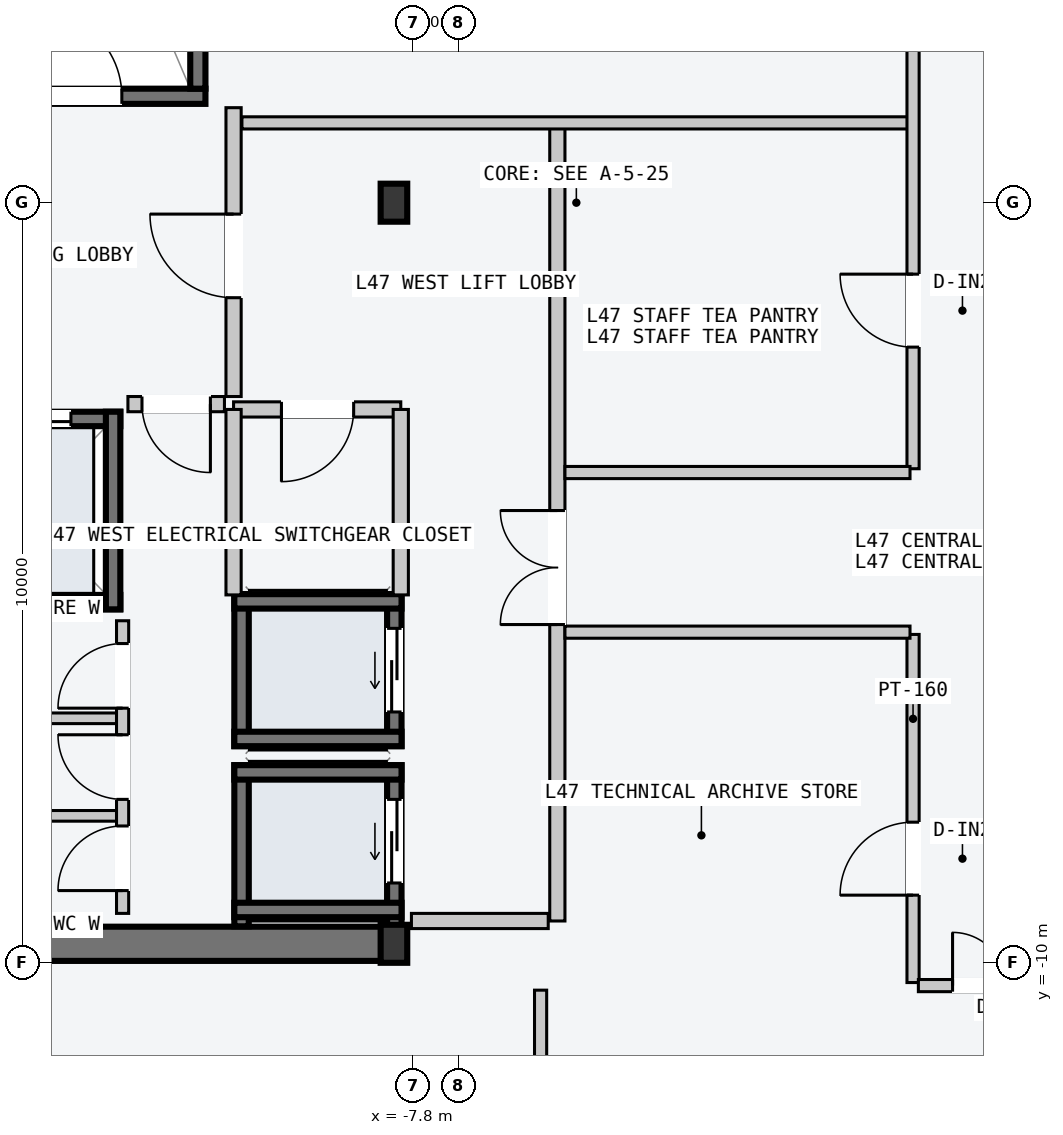
"""IFC4 building model, lengths in metres.
Left out: names, types, materials, properties, quantities, classifications, styles, units other than length and angle.
Written with IfcOpenShell. Run it as: python <this file> out.ifc"""

import sys

from ifc_helpers import new_model, si_unit, direction, frame, frame_2d, origin, origin_2d, place, context, subcontext, project, spatial, rectangle, i_section, extrude, element, fill, save


model = new_model("IFC4")
c1 = context("Model", 3, precision=1e-05, world=origin(), true_north=direction((0.0, 1.0)))
c2 = subcontext(c1, "Body", "Model", "MODEL_VIEW")
j1 = project(units=[si_unit("LENGTHUNIT", "METRE"), si_unit("PLANEANGLEUNIT", "RADIAN")], contexts=[c1])
p1 = place(None, origin())
s1 = spatial("IfcSite", under=j1, at=p1, CompositionType="ELEMENT")
p2 = place(p1, origin())
s2 = spatial("IfcBuilding", under=s1, at=p2, CompositionType="ELEMENT")
p3 = place(p2, frame((0.0, 0.0, 180.3)))
s3 = spatial("IfcBuildingStorey", under=s2, at=p3, CompositionType="ELEMENT", Elevation=180.3)
p4 = place(p3, frame((-14.53, -9.75, -0.2), z_axis=(0.0, 0.0, 1.0), x_axis=(1.0, 0.0, 0.0)))
e1 = element("IfcWall", 1, at=p4, inside=s3, PredefinedType="SHEAR", context=c2, shape_type="SweptSolid", body=[
    extrude(rectangle(XDim=6.46, YDim=0.45, at=frame_2d((3.23, 0.0))), origin(), (0.0, 0.0, 1.0), 3.6),
])
p5 = place(p3, frame((-14.25, 1.4, -0.2), z_axis=(0.0, 0.0, 1.0), x_axis=(1.0, 0.0, 0.0)))
e2 = element("IfcWall", 2, at=p5, inside=s3, PredefinedType="SOLIDWALL", context=c2, shape_type="SweptSolid", body=[
    extrude(rectangle(XDim=3.72, YDim=0.2, at=frame_2d((1.86, 0.0))), origin(), (0.0, 0.0, 1.0), 3.6),
])
p6 = place(p5, frame((1.5, 0.0, 0.2)))
e3 = element("IfcOpeningElement", 3, at=p6, cuts=e2, PredefinedType="OPENING", context=c2, shape_type="SweptSolid", body=[
    extrude(rectangle(XDim=1.12, YDim=2.18, at=frame_2d((0.56, 1.09))), frame((0.0, 0.11, 0.0), z_axis=(0.0, -1.0, 0.0), x_axis=(1.0, 0.0, 0.0)), (0.0, 0.0, 1.0), 0.22),
])
p7 = place(p3, frame((-10.63, 1.5, -0.2), z_axis=(0.0, 0.0, 1.0), x_axis=(0.0, 1.0, 0.0)))
e4 = element("IfcWall", 4, at=p7, inside=s3, PredefinedType="SOLIDWALL", context=c2, shape_type="SweptSolid", body=[
    extrude(rectangle(XDim=7.8, YDim=0.2, at=frame_2d((3.9, 0.0))), origin(), (0.0, 0.0, 1.0), 3.6),
])
for number, where, z_axis, x_axis in (
    (5, (-8.05, -9.75, 0.0), (0.0, 0.0, 1.0), (1.0, 0.0, 0.0)),
    (6, (-8.05, 0.0, 0.0), (0.0, 0.0, 1.0), (1.0, 0.0, 0.0)),
):
    element("IfcColumn", number, at=place(p3, frame(where, z_axis=z_axis, x_axis=x_axis)), inside=s3, PredefinedType="COLUMN", context=c2, shape_type="SweptSolid", body=[
        extrude(i_section(OverallWidth=0.35, OverallDepth=0.5, WebThickness=0.02, FlangeThickness=0.032, at=origin_2d()), origin(), (0.0, 0.0, 1.0), 3.6),
    ])
p8 = place(p3, frame((-8.045, -9.52, -0.2), z_axis=(0.0, 0.0, 1.0), x_axis=(0.0, 1.0, 0.0)))
e7 = element("IfcWall", 7, at=p8, inside=s3, PredefinedType="SOLIDWALL", context=c2, shape_type="SweptSolid", body=[
    extrude(rectangle(XDim=2.12, YDim=0.19, at=frame_2d((1.06, 0.0))), origin(), (0.0, 0.0, 1.0), 3.6),
])
p9 = place(p8, frame((0.57, 0.0, 0.2)))
e8 = element("IfcOpeningElement", 8, at=p9, cuts=e7, PredefinedType="OPENING", context=c2, shape_type="SweptSolid", body=[
    extrude(rectangle(XDim=1.1, YDim=2.2, at=frame_2d((0.55, 1.1))), frame((0.0, 0.105, 0.0), z_axis=(0.0, -1.0, 0.0), x_axis=(1.0, 0.0, 0.0)), (0.0, 0.0, 1.0), 0.21),
])
p10 = place(p3, frame((-10.055, -9.52, -0.2), z_axis=(0.0, 0.0, 1.0), x_axis=(0.0, 1.0, 0.0)))
e9 = element("IfcWall", 9, at=p10, inside=s3, PredefinedType="SOLIDWALL", context=c2, shape_type="SweptSolid", body=[
    extrude(rectangle(XDim=2.12, YDim=0.19, at=frame_2d((1.06, 0.0))), origin(), (0.0, 0.0, 1.0), 3.6),
])
for number, where, z_axis, x_axis in (
    (10, (-10.15, -7.495, -0.2), (0.0, 0.0, 1.0), (1.0, 0.0, 0.0)),
    (11, (-10.15, -9.305, -0.2), (0.0, 0.0, 1.0), (1.0, 0.0, 0.0)),
):
    element("IfcWall", number, at=place(p3, frame(where, z_axis=z_axis, x_axis=x_axis)), inside=s3, PredefinedType="SOLIDWALL", context=c2, shape_type="SweptSolid", body=[
        extrude(rectangle(XDim=2.2, YDim=0.19, at=frame_2d((1.1, 0.0))), origin(), (0.0, 0.0, 1.0), 3.6),
    ])
p11 = place(p3, frame((-8.045, -7.15, -0.2), z_axis=(0.0, 0.0, 1.0), x_axis=(0.0, 1.0, 0.0)))
e12 = element("IfcWall", 12, at=p11, inside=s3, PredefinedType="SOLIDWALL", context=c2, shape_type="SweptSolid", body=[
    extrude(rectangle(XDim=2.0, YDim=0.19, at=frame_2d((1.0, 0.0))), origin(), (0.0, 0.0, 1.0), 3.6),
])
p12 = place(p11, frame((0.45, 0.0, 0.2)))
e13 = element("IfcOpeningElement", 13, at=p12, cuts=e12, PredefinedType="OPENING", context=c2, shape_type="SweptSolid", body=[
    extrude(rectangle(XDim=1.1, YDim=2.2, at=frame_2d((0.55, 1.1))), frame((0.0, 0.105, 0.0), z_axis=(0.0, -1.0, 0.0), x_axis=(1.0, 0.0, 0.0)), (0.0, 0.0, 1.0), 0.21),
])
p13 = place(p3, frame((-10.055, -7.15, -0.2), z_axis=(0.0, 0.0, 1.0), x_axis=(0.0, 1.0, 0.0)))
e14 = element("IfcWall", 14, at=p13, inside=s3, PredefinedType="SOLIDWALL", context=c2, shape_type="SweptSolid", body=[
    extrude(rectangle(XDim=2.0, YDim=0.19, at=frame_2d((1.0, 0.0))), origin(), (0.0, 0.0, 1.0), 3.6),
])
for number, where, z_axis, x_axis in (
    (15, (-10.15, -5.245, -0.2), (0.0, 0.0, 1.0), (1.0, 0.0, 0.0)),
    (16, (-10.15, -7.055, -0.2), (0.0, 0.0, 1.0), (1.0, 0.0, 0.0)),
):
    element("IfcWall", number, at=place(p3, frame(where, z_axis=z_axis, x_axis=x_axis)), inside=s3, PredefinedType="SOLIDWALL", context=c2, shape_type="SweptSolid", body=[
        extrude(rectangle(XDim=2.2, YDim=0.19, at=frame_2d((1.1, 0.0))), origin(), (0.0, 0.0, 1.0), 3.6),
    ])
p14 = place(p3, frame((-14.33, -2.845, -0.2), z_axis=(0.0, 0.0, 1.0), x_axis=(1.0, 0.0, 0.0)))
e17 = element("IfcWall", 17, at=p14, inside=s3, PredefinedType="SOLIDWALL", context=c2, shape_type="SweptSolid", body=[
    extrude(rectangle(XDim=2.68, YDim=0.19, at=frame_2d((1.34, 0.0))), origin(), (0.0, 0.0, 1.0), 3.6),
])
p15 = place(p14, frame((0.83, 0.0, 0.2)))
e18 = element("IfcOpeningElement", 18, at=p15, cuts=e17, PredefinedType="OPENING", context=c2, shape_type="SweptSolid", body=[
    extrude(rectangle(XDim=1.2, YDim=2.2, at=frame_2d((0.6, 1.1))), frame((0.0, 0.105, 0.0), z_axis=(0.0, -1.0, 0.0), x_axis=(1.0, 0.0, 0.0)), (0.0, 0.0, 1.0), 0.21),
])
p16 = place(p3, frame((-14.33, -5.255, -0.2), z_axis=(0.0, 0.0, 1.0), x_axis=(1.0, 0.0, 0.0)))
e19 = element("IfcWall", 19, at=p16, inside=s3, PredefinedType="SOLIDWALL", context=c2, shape_type="SweptSolid", body=[
    extrude(rectangle(XDim=2.68, YDim=0.19, at=frame_2d((1.34, 0.0))), origin(), (0.0, 0.0, 1.0), 3.6),
])
p17 = place(p3, frame((-11.745, -5.35, -0.2), z_axis=(0.0, 0.0, 1.0), x_axis=(0.0, 1.0, 0.0)))
e20 = element("IfcWall", 20, at=p17, inside=s3, PredefinedType="SOLIDWALL", context=c2, shape_type="SweptSolid", body=[
    extrude(rectangle(XDim=2.6, YDim=0.19, at=frame_2d((1.3, 0.0))), origin(), (0.0, 0.0, 1.0), 3.6),
])
p18 = place(p3, frame((-5.9, -9.45, 0.0), z_axis=(0.0, 0.0, 1.0), x_axis=(0.0, 1.0, 0.0)))
e21 = element("IfcWall", 21, at=p18, inside=s3, PredefinedType="PARTITIONING", context=c2, shape_type="SweptSolid", body=[
    extrude(rectangle(XDim=10.5, YDim=0.2, at=frame_2d((5.25, 0.0))), origin(), (0.0, 0.0, 1.0), 3.4),
])
p19 = place(p18, frame((3.9, 0.0, 0.0)))
e22 = element("IfcOpeningElement", 22, at=p19, cuts=e21, PredefinedType="OPENING", context=c2, shape_type="SweptSolid", body=[
    extrude(rectangle(XDim=1.5, YDim=2.2, at=frame_2d((0.75, 1.1))), frame((0.0, 0.11, 0.0), z_axis=(0.0, -1.0, 0.0), x_axis=(1.0, 0.0, 0.0)), (0.0, 0.0, 1.0), 0.22),
])
p20 = place(p3, frame((-6.02, -9.45, 0.0), z_axis=(0.0, 0.0, 1.0), x_axis=(-1.0, 0.0, 0.0)))
e23 = element("IfcWall", 23, at=p20, inside=s3, PredefinedType="PARTITIONING", context=c2, shape_type="SweptSolid", body=[
    extrude(rectangle(XDim=1.8, YDim=0.2, at=frame_2d((0.9, 0.0))), origin(), (0.0, 0.0, 1.0), 3.4),
])
p21 = place(p3, frame((-10.16, -2.55, 0.0), z_axis=(0.0, 0.0, 1.0), x_axis=(0.0, 1.0, 0.0)))
e24 = element("IfcWall", 24, at=p21, inside=s3, PredefinedType="PARTITIONING", context=c2, shape_type="SweptSolid", body=[
    extrude(rectangle(XDim=3.8, YDim=0.2, at=frame_2d((1.9, 0.0))), origin(), (0.0, 0.0, 1.0), 3.4),
])
p22 = place(p21, frame((1.3, 0.0, 0.0)))
e25 = element("IfcOpeningElement", 25, at=p22, cuts=e24, PredefinedType="OPENING", context=c2, shape_type="SweptSolid", body=[
    extrude(rectangle(XDim=1.1, YDim=2.15, at=frame_2d((0.55, 1.075))), frame((0.0, 0.11, 0.0), z_axis=(0.0, -1.0, 0.0), x_axis=(1.0, 0.0, 0.0)), (0.0, 0.0, 1.0), 0.22),
])
p23 = place(p3, frame((-10.28, -2.65, 0.0), z_axis=(0.0, 0.0, 1.0), x_axis=(-1.0, 0.0, 0.0)))
e26 = element("IfcWall", 26, at=p23, inside=s3, PredefinedType="PARTITIONING", context=c2, shape_type="SweptSolid", body=[
    extrude(rectangle(XDim=1.27, YDim=0.2, at=frame_2d((0.635, 0.0))), origin(), (0.0, 0.0, 1.0), 3.4),
])
p24 = place(p23, frame((0.185, 0.0, 0.0)))
e27 = element("IfcOpeningElement", 27, at=p24, cuts=e26, PredefinedType="OPENING", context=c2, shape_type="SweptSolid", body=[
    extrude(rectangle(XDim=0.9, YDim=2.15, at=frame_2d((0.45, 1.075))), frame((0.0, 0.11, 0.0), z_axis=(0.0, -1.0, 0.0), x_axis=(1.0, 0.0, 0.0)), (0.0, 0.0, 1.0), 0.22),
])
p25 = place(p3, frame((-7.96, -2.72, 0.0), z_axis=(0.0, 0.0, 1.0), x_axis=(-1.0, 0.0, 0.0)))
e28 = element("IfcWall", 28, at=p25, inside=s3, PredefinedType="PARTITIONING", context=c2, shape_type="SweptSolid", body=[
    extrude(rectangle(XDim=2.2, YDim=0.2, at=frame_2d((1.1, 0.0))), origin(), (0.0, 0.0, 1.0), 3.4),
])
p26 = place(p25, frame((0.62, 0.0, 0.0)))
e29 = element("IfcOpeningElement", 29, at=p26, cuts=e28, PredefinedType="OPENING", context=c2, shape_type="SweptSolid", body=[
    extrude(rectangle(XDim=0.95, YDim=2.1, at=frame_2d((0.475, 1.05))), frame((0.0, 0.11, 0.0), z_axis=(0.0, -1.0, 0.0), x_axis=(1.0, 0.0, 0.0)), (0.0, 0.0, 1.0), 0.22),
])
for number, where, z_axis, x_axis in (
    (30, (-7.96, -5.16, 0.0), (0.0, 0.0, 1.0), (0.0, 1.0, 0.0)),
    (31, (-10.16, -5.16, 0.0), (0.0, 0.0, 1.0), (0.0, 1.0, 0.0)),
):
    element("IfcWall", number, at=place(p3, frame(where, z_axis=z_axis, x_axis=x_axis)), inside=s3, PredefinedType="PARTITIONING", context=c2, shape_type="SweptSolid", body=[
        extrude(rectangle(XDim=2.44, YDim=0.2, at=frame_2d((1.22, 0.0))), origin(), (0.0, 0.0, 1.0), 3.4),
    ])
for number, where, z_axis, x_axis in (
    (32, (-11.7, -8.067, 0.0), (0.0, 0.0, 1.0), (-1.0, 0.0, 0.0)),
    (33, (-11.7, -6.783, 0.0), (0.0, 0.0, 1.0), (-1.0, 0.0, 0.0)),
):
    element("IfcWall", number, at=place(p3, frame(where, z_axis=z_axis, x_axis=x_axis)), inside=s3, PredefinedType="PARTITIONING", context=c2, shape_type="SweptSolid", body=[
        extrude(rectangle(XDim=2.5, YDim=0.14, at=frame_2d((1.25, 0.0))), origin(), (0.0, 0.0, 1.0), 3.4),
    ])
p27 = place(p3, frame((-11.62, -9.35, 0.0), z_axis=(0.0, 0.0, 1.0), x_axis=(0.0, 1.0, 0.0)))
e34 = element("IfcWall", 34, at=p27, inside=s3, PredefinedType="PARTITIONING", context=c2, shape_type="SweptSolid", body=[
    extrude(rectangle(XDim=3.85, YDim=0.16, at=frame_2d((1.925, 0.0))), origin(), (0.0, 0.0, 1.0), 3.4),
])
p28 = place(p27, frame((0.3, 0.0, 0.0)))
e35 = element("IfcOpeningElement", 35, at=p28, cuts=e34, PredefinedType="OPENING", context=c2, shape_type="SweptSolid", body=[
    extrude(rectangle(XDim=0.85, YDim=2.12, at=frame_2d((0.425, 1.06))), frame((0.0, 0.09, 0.0), z_axis=(0.0, -1.0, 0.0), x_axis=(1.0, 0.0, 0.0)), (0.0, 0.0, 1.0), 0.18),
])
p29 = place(p27, frame((1.5, 0.0, 0.0)))
e36 = element("IfcOpeningElement", 36, at=p29, cuts=e34, PredefinedType="OPENING", context=c2, shape_type="SweptSolid", body=[
    extrude(rectangle(XDim=0.85, YDim=2.12, at=frame_2d((0.425, 1.06))), frame((0.0, 0.09, 0.0), z_axis=(0.0, -1.0, 0.0), x_axis=(1.0, 0.0, 0.0)), (0.0, 0.0, 1.0), 0.18),
])
p30 = place(p27, frame((2.7, 0.0, 0.0)))
e37 = element("IfcOpeningElement", 37, at=p30, cuts=e34, PredefinedType="OPENING", context=c2, shape_type="SweptSolid", body=[
    extrude(rectangle(XDim=0.85, YDim=2.12, at=frame_2d((0.425, 1.06))), frame((0.0, 0.09, 0.0), z_axis=(0.0, -1.0, 0.0), x_axis=(1.0, 0.0, 0.0)), (0.0, 0.0, 1.0), 0.18),
])
p31 = place(p3, frame((-10.05, 1.05, 0.0), z_axis=(0.0, 0.0, 1.0), x_axis=(1.0, 0.0, 0.0)))
e38 = element("IfcWall", 38, at=p31, inside=s3, PredefinedType="PARTITIONING", context=c2, shape_type="SweptSolid", body=[
    extrude(rectangle(XDim=8.79, YDim=0.16, at=frame_2d((4.395, 0.0))), origin(), (0.0, 0.0, 1.0), 3.4),
])
p32 = place(p3, frame((-1.22, -3.5, 0.0), z_axis=(0.0, 0.0, 1.0), x_axis=(0.0, 1.0, 0.0)))
e39 = element("IfcWall", 39, at=p32, inside=s3, PredefinedType="PARTITIONING", context=c2, shape_type="SweptSolid", body=[
    extrude(rectangle(XDim=15.17, YDim=0.16, at=frame_2d((7.585, 0.0))), origin(), (0.0, 0.0, 1.0), 3.4),
])
p33 = place(p32, frame((6.1, 0.0, 0.0)))
e40 = element("IfcOpeningElement", 40, at=p33, cuts=e39, PredefinedType="OPENING", context=c2, shape_type="SweptSolid", body=[
    extrude(rectangle(XDim=1.24, YDim=2.24, at=frame_2d((0.62, 1.12))), frame((0.0, 0.09, 0.0), z_axis=(0.0, -1.0, 0.0), x_axis=(1.0, 0.0, 0.0)), (0.0, 0.0, 1.0), 0.18),
])
p34 = place(p32, frame((1.6, 0.0, 0.0)))
e41 = element("IfcOpeningElement", 41, at=p34, cuts=e39, PredefinedType="OPENING", context=c2, shape_type="SweptSolid", body=[
    extrude(rectangle(XDim=0.96, YDim=2.18, at=frame_2d((0.48, 1.09))), frame((0.0, 0.09, 0.0), z_axis=(0.0, -1.0, 0.0), x_axis=(1.0, 0.0, 0.0)), (0.0, 0.0, 1.0), 0.18),
])
p35 = place(p3, frame((-5.8, -3.55, 0.0), z_axis=(0.0, 0.0, 1.0), x_axis=(1.0, 0.0, 0.0)))
e42 = element("IfcWall", 42, at=p35, inside=s3, PredefinedType="PARTITIONING", context=c2, shape_type="SweptSolid", body=[
    extrude(rectangle(XDim=4.54, YDim=0.16, at=frame_2d((2.27, 0.0))), origin(), (0.0, 0.0, 1.0), 3.4),
])
p36 = place(p3, frame((-1.22, -10.26, 0.0), z_axis=(0.0, 0.0, 1.0), x_axis=(0.0, 1.0, 0.0)))
e43 = element("IfcWall", 43, at=p36, inside=s3, PredefinedType="PARTITIONING", context=c2, shape_type="SweptSolid", body=[
    extrude(rectangle(XDim=4.58, YDim=0.16, at=frame_2d((2.29, 0.0))), origin(), (0.0, 0.0, 1.0), 3.4),
])
p37 = place(p36, frame((1.15, 0.0, 0.0)))
e44 = element("IfcOpeningElement", 44, at=p37, cuts=e43, PredefinedType="OPENING", context=c2, shape_type="SweptSolid", body=[
    extrude(rectangle(XDim=0.96, YDim=2.18, at=frame_2d((0.48, 1.09))), frame((0.0, 0.09, 0.0), z_axis=(0.0, -1.0, 0.0), x_axis=(1.0, 0.0, 0.0)), (0.0, 0.0, 1.0), 0.18),
])
p38 = place(p3, frame((-5.8, -5.65, 0.0), z_axis=(0.0, 0.0, 1.0), x_axis=(1.0, 0.0, 0.0)))
e45 = element("IfcWall", 45, at=p38, inside=s3, PredefinedType="PARTITIONING", context=c2, shape_type="SweptSolid", body=[
    extrude(rectangle(XDim=4.54, YDim=0.16, at=frame_2d((2.27, 0.0))), origin(), (0.0, 0.0, 1.0), 3.4),
])
p39 = place(p3, frame((-6.12, -18.56, 0.0), z_axis=(0.0, 0.0, 1.0), x_axis=(0.0, 1.0, 0.0)))
e46 = element("IfcWall", 46, at=p39, inside=s3, PredefinedType="PARTITIONING", context=c2, shape_type="SweptSolid", body=[
    extrude(rectangle(XDim=8.2, YDim=0.16, at=frame_2d((4.1, 0.0))), origin(), (0.0, 0.0, 1.0), 3.4),
])
p40 = place(p39, frame((1.05, 0.0, 0.0)))
e47 = element("IfcOpeningElement", 47, at=p40, cuts=e46, PredefinedType="OPENING", context=c2, shape_type="SweptSolid", body=[
    extrude(rectangle(XDim=0.96, YDim=2.18, at=frame_2d((0.48, 1.09))), frame((0.0, 0.09, 0.0), z_axis=(0.0, -1.0, 0.0), x_axis=(1.0, 0.0, 0.0)), (0.0, 0.0, 1.0), 0.18),
])
p41 = place(p3, frame((-1.15, -10.3, 0.0), z_axis=(0.0, 0.0, 1.0), x_axis=(1.0, 0.0, 0.0)))
e48 = element("IfcWall", 48, at=p41, inside=s3, PredefinedType="PARTITIONING", context=c2, shape_type="SweptSolid", body=[
    extrude(rectangle(XDim=2.3, YDim=0.16, at=frame_2d((1.15, 0.0))), origin(), (0.0, 0.0, 1.0), 3.4),
])
p42 = place(p41, frame((0.45, 0.0, 0.0)))
e49 = element("IfcOpeningElement", 49, at=p42, cuts=e48, PredefinedType="OPENING", context=c2, shape_type="SweptSolid", body=[
    extrude(rectangle(XDim=1.4, YDim=2.2, at=frame_2d((0.7, 1.1))), frame((0.0, 0.09, 0.0), z_axis=(0.0, -1.0, 0.0), x_axis=(1.0, 0.0, 0.0)), (0.0, 0.0, 1.0), 0.18),
])
p43 = place(p6, origin())
e50 = element("IfcDoor", 50, at=p43, inside=s3, OperationType="SINGLE_SWING_LEFT", PredefinedType="DOOR", context=c2, shape_type="SweptSolid", body=[
    extrude(rectangle(XDim=1.12, YDim=2.18, at=frame_2d((0.56, 1.09))), frame((0.0, 0.025, 0.0), z_axis=(0.0, -1.0, 0.0), x_axis=(1.0, 0.0, 0.0)), (0.0, 0.0, 1.0), 0.05),
])
fill(e3, e50)
p44 = place(p9, origin())
e51 = element("IfcDoor", 51, at=p44, inside=s3, OperationType="SLIDING_TO_LEFT", PredefinedType="DOOR", context=c2, shape_type="SweptSolid", body=[
    extrude(rectangle(XDim=1.1, YDim=2.2, at=frame_2d((0.55, 1.1))), frame((0.0, 0.025, 0.0), z_axis=(0.0, -1.0, 0.0), x_axis=(1.0, 0.0, 0.0)), (0.0, 0.0, 1.0), 0.05),
])
fill(e8, e51)
p45 = place(p12, origin())
e52 = element("IfcDoor", 52, at=p45, inside=s3, OperationType="SLIDING_TO_LEFT", PredefinedType="DOOR", context=c2, shape_type="SweptSolid", body=[
    extrude(rectangle(XDim=1.1, YDim=2.2, at=frame_2d((0.55, 1.1))), frame((0.0, 0.025, 0.0), z_axis=(0.0, -1.0, 0.0), x_axis=(1.0, 0.0, 0.0)), (0.0, 0.0, 1.0), 0.05),
])
fill(e13, e52)
p46 = place(p15, origin())
e53 = element("IfcDoor", 53, at=p46, inside=s3, OperationType="SLIDING_TO_LEFT", PredefinedType="DOOR", context=c2, shape_type="SweptSolid", body=[
    extrude(rectangle(XDim=1.2, YDim=2.2, at=frame_2d((0.6, 1.1))), frame((0.0, 0.025, 0.0), z_axis=(0.0, -1.0, 0.0), x_axis=(1.0, 0.0, 0.0)), (0.0, 0.0, 1.0), 0.05),
])
fill(e18, e53)
p47 = place(p19, origin())
e54 = element("IfcDoor", 54, at=p47, inside=s3, OperationType="DOUBLE_DOOR_SINGLE_SWING", PredefinedType="DOOR", context=c2, shape_type="SweptSolid", body=[
    extrude(rectangle(XDim=1.5, YDim=2.2, at=frame_2d((0.75, 1.1))), frame((0.0, 0.025, 0.0), z_axis=(0.0, -1.0, 0.0), x_axis=(1.0, 0.0, 0.0)), (0.0, 0.0, 1.0), 0.05),
])
fill(e22, e54)
p48 = place(p22, origin())
e55 = element("IfcDoor", 55, at=p48, inside=s3, OperationType="SINGLE_SWING_RIGHT", PredefinedType="DOOR", context=c2, shape_type="SweptSolid", body=[
    extrude(rectangle(XDim=1.1, YDim=2.15, at=frame_2d((0.55, 1.075))), frame((0.0, 0.025, 0.0), z_axis=(0.0, -1.0, 0.0), x_axis=(1.0, 0.0, 0.0)), (0.0, 0.0, 1.0), 0.05),
])
fill(e25, e55)
p49 = place(p24, origin())
e56 = element("IfcDoor", 56, at=p49, inside=s3, OperationType="SINGLE_SWING_LEFT", PredefinedType="DOOR", context=c2, shape_type="SweptSolid", body=[
    extrude(rectangle(XDim=0.9, YDim=2.15, at=frame_2d((0.45, 1.075))), frame((0.0, 0.025, 0.0), z_axis=(0.0, -1.0, 0.0), x_axis=(1.0, 0.0, 0.0)), (0.0, 0.0, 1.0), 0.05),
])
fill(e27, e56)
p50 = place(p26, origin())
e57 = element("IfcDoor", 57, at=p50, inside=s3, OperationType="SINGLE_SWING_RIGHT", PredefinedType="DOOR", context=c2, shape_type="SweptSolid", body=[
    extrude(rectangle(XDim=0.95, YDim=2.1, at=frame_2d((0.475, 1.05))), frame((0.0, 0.025, 0.0), z_axis=(0.0, -1.0, 0.0), x_axis=(1.0, 0.0, 0.0)), (0.0, 0.0, 1.0), 0.05),
])
fill(e29, e57)
p51 = place(p28, origin())
e58 = element("IfcDoor", 58, at=p51, inside=s3, OperationType="SINGLE_SWING_LEFT", PredefinedType="DOOR", context=c2, shape_type="SweptSolid", body=[
    extrude(rectangle(XDim=0.85, YDim=2.12, at=frame_2d((0.425, 1.06))), frame((0.0, 0.025, 0.0), z_axis=(0.0, -1.0, 0.0), x_axis=(1.0, 0.0, 0.0)), (0.0, 0.0, 1.0), 0.05),
])
fill(e35, e58)
p52 = place(p29, origin())
e59 = element("IfcDoor", 59, at=p52, inside=s3, OperationType="SINGLE_SWING_RIGHT", PredefinedType="DOOR", context=c2, shape_type="SweptSolid", body=[
    extrude(rectangle(XDim=0.85, YDim=2.12, at=frame_2d((0.425, 1.06))), frame((0.0, 0.025, 0.0), z_axis=(0.0, -1.0, 0.0), x_axis=(1.0, 0.0, 0.0)), (0.0, 0.0, 1.0), 0.05),
])
fill(e36, e59)
p53 = place(p30, origin())
e60 = element("IfcDoor", 60, at=p53, inside=s3, OperationType="SINGLE_SWING_LEFT", PredefinedType="DOOR", context=c2, shape_type="SweptSolid", body=[
    extrude(rectangle(XDim=0.85, YDim=2.12, at=frame_2d((0.425, 1.06))), frame((0.0, 0.025, 0.0), z_axis=(0.0, -1.0, 0.0), x_axis=(1.0, 0.0, 0.0)), (0.0, 0.0, 1.0), 0.05),
])
fill(e37, e60)
p54 = place(p34, origin())
e61 = element("IfcDoor", 61, at=p54, inside=s3, OperationType="SINGLE_SWING_RIGHT", PredefinedType="DOOR", context=c2, shape_type="SweptSolid", body=[
    extrude(rectangle(XDim=0.96, YDim=2.18, at=frame_2d((0.48, 1.09))), frame((0.0, 0.025, 0.0), z_axis=(0.0, -1.0, 0.0), x_axis=(1.0, 0.0, 0.0)), (0.0, 0.0, 1.0), 0.05),
])
fill(e41, e61)
p55 = place(p37, origin())
e62 = element("IfcDoor", 62, at=p55, inside=s3, OperationType="SINGLE_SWING_LEFT", PredefinedType="DOOR", context=c2, shape_type="SweptSolid", body=[
    extrude(rectangle(XDim=0.96, YDim=2.18, at=frame_2d((0.48, 1.09))), frame((0.0, 0.025, 0.0), z_axis=(0.0, -1.0, 0.0), x_axis=(1.0, 0.0, 0.0)), (0.0, 0.0, 1.0), 0.05),
])
fill(e44, e62)
p56 = place(p42, origin())
e63 = element("IfcDoor", 63, at=p56, inside=s3, OperationType="DOUBLE_DOOR_SINGLE_SWING", PredefinedType="DOOR", context=c2, shape_type="SweptSolid", body=[
    extrude(rectangle(XDim=1.4, YDim=2.2, at=frame_2d((0.7, 1.1))), frame((0.0, 0.025, 0.0), z_axis=(0.0, -1.0, 0.0), x_axis=(1.0, 0.0, 0.0)), (0.0, 0.0, 1.0), 0.05),
])
fill(e49, e63)
save(model, sys.argv[1])
